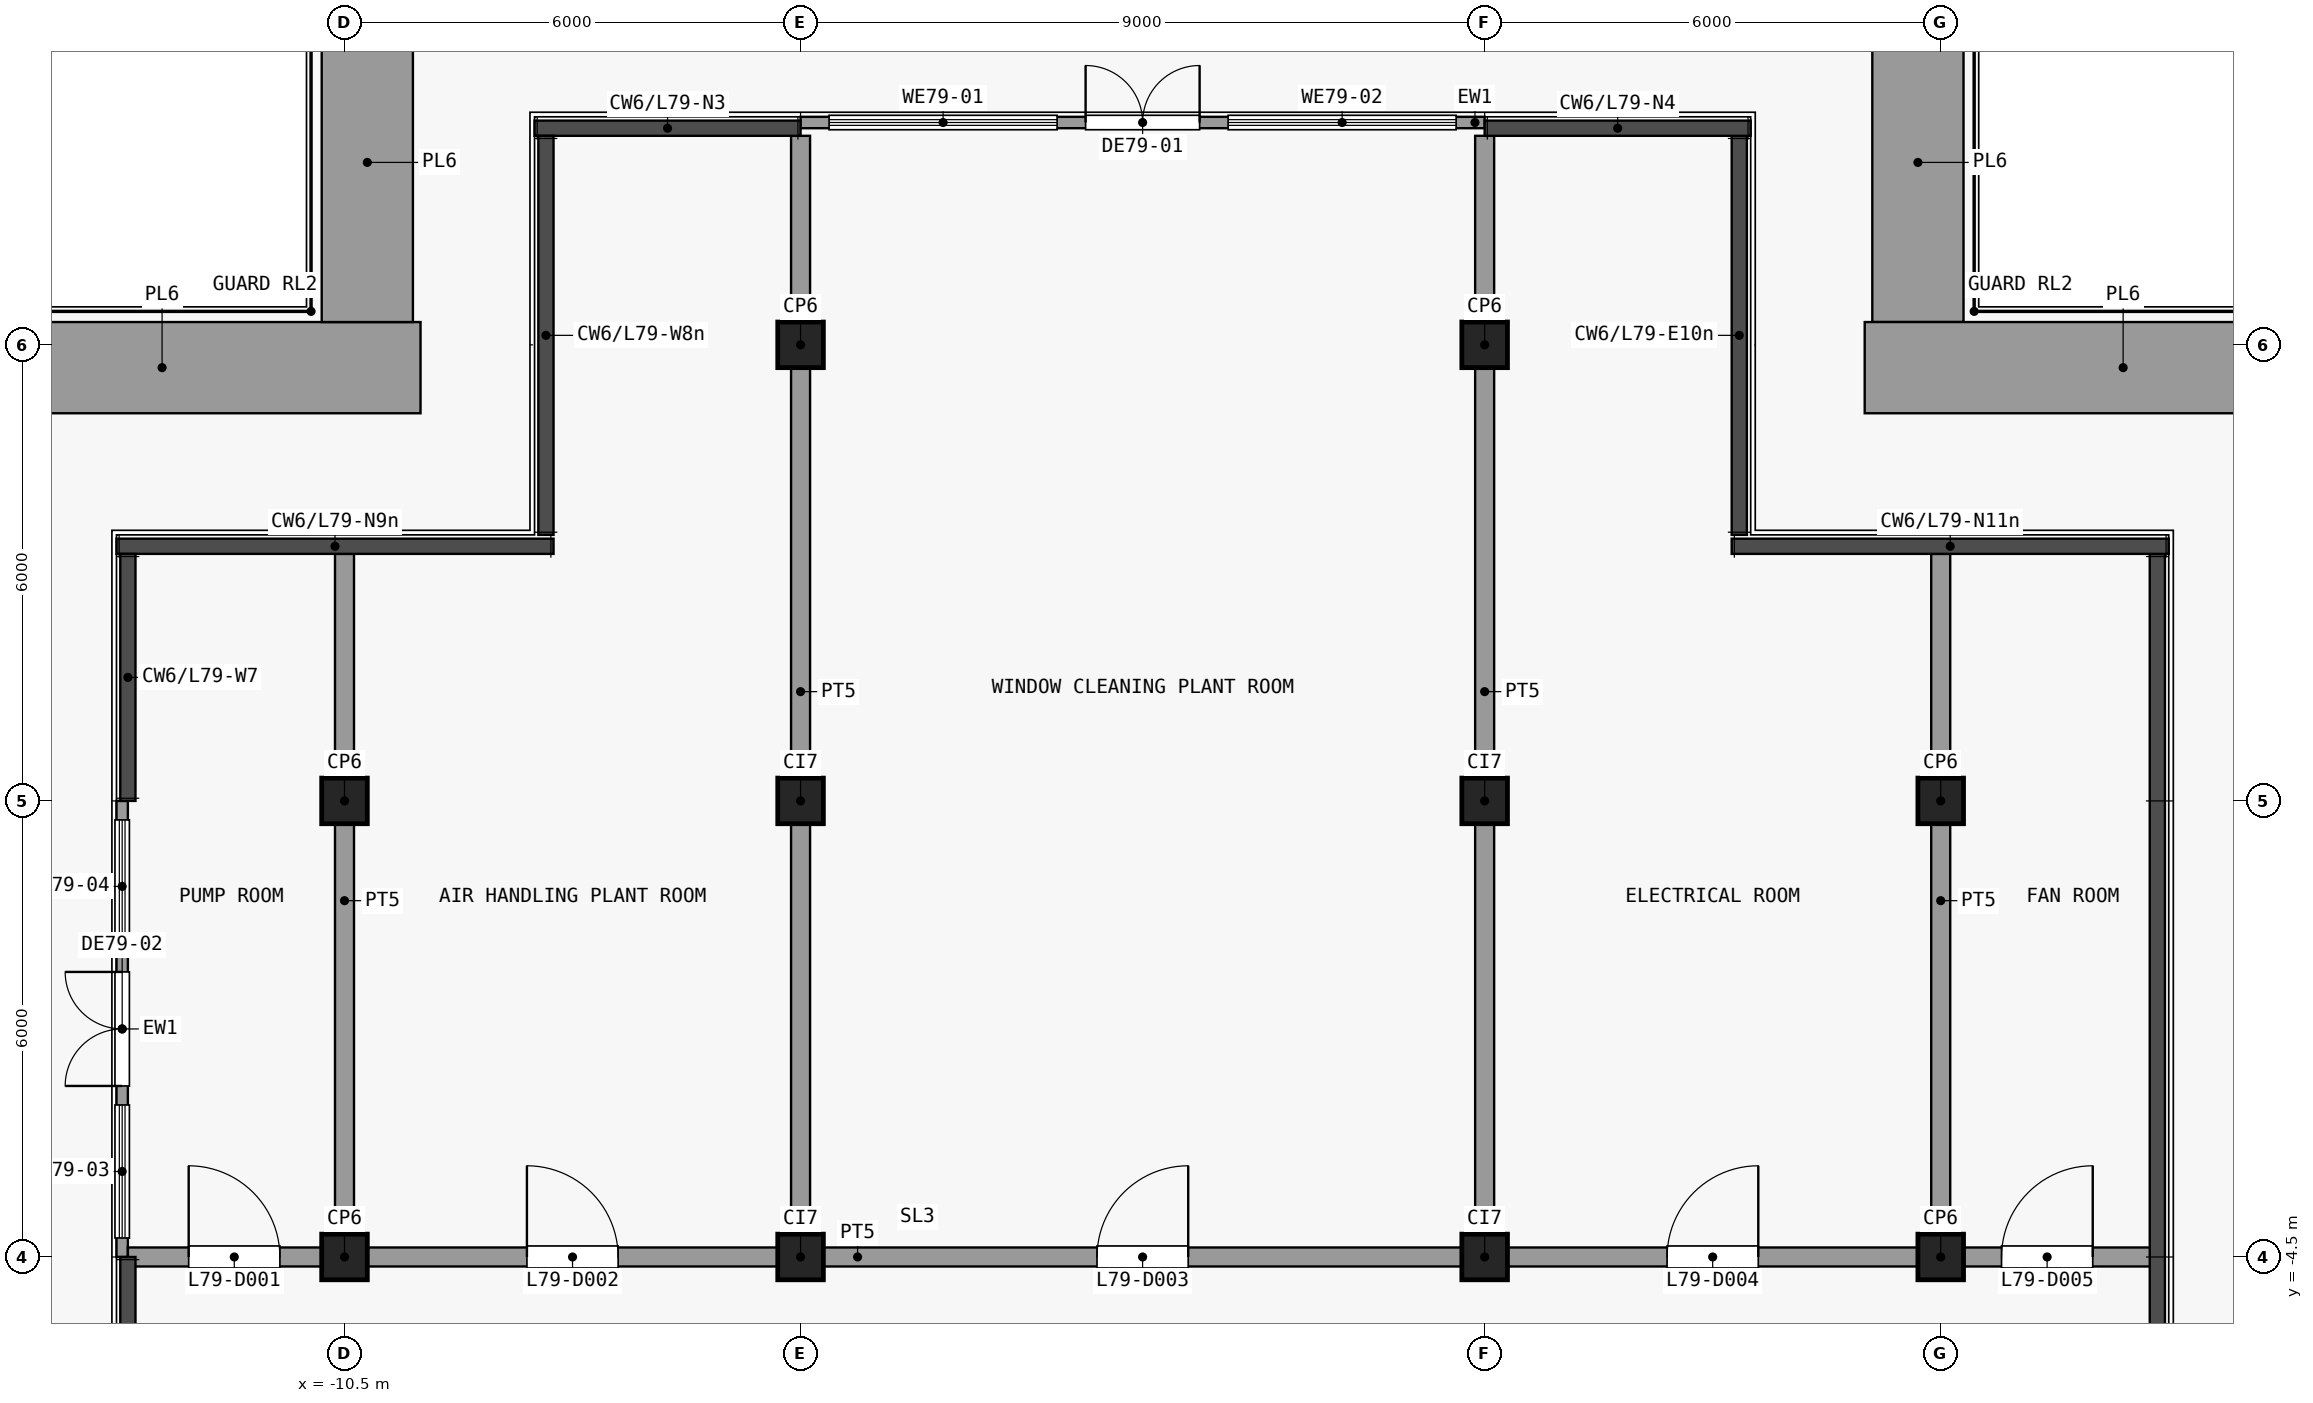
"""IFC4 building model, lengths in metres.
Left out: names, types, materials, properties, quantities, classifications, styles, units other than length and angle.
Written with IfcOpenShell. Run it as: python <this file> out.ifc"""

import sys

from ifc_helpers import new_model, si_unit, direction, frame, frame_2d, origin, origin_2d, place, context, subcontext, project, spatial, rectangle, extrude, element, fill, save


model = new_model("IFC4")
c1 = context("Model", 3, precision=1e-05, world=origin(), true_north=direction((0.0, 1.0)))
c2 = subcontext(c1, "Body", "Model", "MODEL_VIEW")
j1 = project(units=[si_unit("LENGTHUNIT", "METRE"), si_unit("PLANEANGLEUNIT", "RADIAN")], contexts=[c1])
p1 = place(None, origin())
s1 = spatial("IfcSite", under=j1, at=p1, CompositionType="ELEMENT")
p2 = place(p1, origin())
s2 = spatial("IfcBuilding", under=s1, at=p2, CompositionType="ELEMENT")
p3 = place(p2, frame((0.0, 0.0, 312.2)))
s3 = spatial("IfcBuildingStorey", under=s2, at=p3, CompositionType="ELEMENT", Elevation=312.2)
for number, where, z_axis, x_axis in (
    (1, (-10.5, -4.5, 0.0), (0.0, 0.0, 1.0), (1.0, 0.0, 0.0)),
    (2, (-10.5, 1.5, 0.0), (0.0, 0.0, 1.0), (1.0, 0.0, 0.0)),
    (3, (-4.5, -4.5, 0.0), (0.0, 0.0, 1.0), (1.0, 0.0, 0.0)),
    (4, (-4.5, 1.5, 0.0), (0.0, 0.0, 1.0), (1.0, 0.0, 0.0)),
    (5, (-4.5, 7.5, 0.0), (0.0, 0.0, 1.0), (1.0, 0.0, 0.0)),
    (6, (4.5, -4.5, 0.0), (0.0, 0.0, 1.0), (1.0, 0.0, 0.0)),
    (7, (4.5, 1.5, 0.0), (0.0, 0.0, 1.0), (1.0, 0.0, 0.0)),
    (8, (4.5, 7.5, 0.0), (0.0, 0.0, 1.0), (1.0, 0.0, 0.0)),
    (9, (10.5, -4.5, 0.0), (0.0, 0.0, 1.0), (1.0, 0.0, 0.0)),
    (10, (10.5, 1.5, 0.0), (0.0, 0.0, 1.0), (1.0, 0.0, 0.0)),
):
    element("IfcColumn", number, at=place(p3, frame(where, z_axis=z_axis, x_axis=x_axis)), inside=s3, PredefinedType="COLUMN", context=c2, shape_type="SweptSolid", body=[
        extrude(rectangle(XDim=0.6, YDim=0.6, at=origin_2d()), origin(), (0.0, 0.0, 1.0), 4.5),
    ])
p4 = place(p3, frame((-4.5, 10.425, 0.0), z_axis=(0.0, 0.0, 1.0), x_axis=(1.0, 0.0, 0.0)))
e11 = element("IfcWall", 11, at=p4, inside=s3, PredefinedType="SOLIDWALL", context=c2, shape_type="SweptSolid", body=[
    extrude(rectangle(XDim=9.0, YDim=0.15, at=frame_2d((4.5, 0.0))), origin(), (0.0, 0.0, 1.0), 4.2),
])
p5 = place(p4, frame((3.75, 0.0, 0.0)))
e12 = element("IfcOpeningElement", 12, at=p5, cuts=e11, PredefinedType="OPENING", context=c2, shape_type="SweptSolid", body=[
    extrude(rectangle(XDim=1.5, YDim=2.4, at=frame_2d((0.75, 1.2))), frame((0.0, 0.085, 0.0), z_axis=(0.0, -1.0, 0.0), x_axis=(1.0, 0.0, 0.0)), (0.0, 0.0, 1.0), 0.17),
])
p6 = place(p4, frame((0.375, 0.0, 0.9)))
e13 = element("IfcOpeningElement", 13, at=p6, cuts=e11, PredefinedType="OPENING", context=c2, shape_type="SweptSolid", body=[
    extrude(rectangle(XDim=3.0, YDim=2.1, at=frame_2d((1.5, 1.05))), frame((0.0, 0.085, 0.0), z_axis=(0.0, -1.0, 0.0), x_axis=(1.0, 0.0, 0.0)), (0.0, 0.0, 1.0), 0.17),
])
p7 = place(p4, frame((5.625, 0.0, 0.9)))
e14 = element("IfcOpeningElement", 14, at=p7, cuts=e11, PredefinedType="OPENING", context=c2, shape_type="SweptSolid", body=[
    extrude(rectangle(XDim=3.0, YDim=2.1, at=frame_2d((1.5, 1.05))), frame((0.0, 0.085, 0.0), z_axis=(0.0, -1.0, 0.0), x_axis=(1.0, 0.0, 0.0)), (0.0, 0.0, 1.0), 0.17),
])
p8 = place(p3, frame((-13.425, -4.5, 0.0), z_axis=(0.0, 0.0, 1.0), x_axis=(0.0, 1.0, 0.0)))
e15 = element("IfcWall", 15, at=p8, inside=s3, PredefinedType="SOLIDWALL", context=c2, shape_type="SweptSolid", body=[
    extrude(rectangle(XDim=6.0, YDim=0.15, at=frame_2d((3.0, 0.0))), origin(), (0.0, 0.0, 1.0), 4.2),
])
p9 = place(p8, frame((2.25, 0.0, 0.0)))
e16 = element("IfcOpeningElement", 16, at=p9, cuts=e15, PredefinedType="OPENING", context=c2, shape_type="SweptSolid", body=[
    extrude(rectangle(XDim=1.5, YDim=2.4, at=frame_2d((0.75, 1.2))), frame((0.0, 0.085, 0.0), z_axis=(0.0, -1.0, 0.0), x_axis=(1.0, 0.0, 0.0)), (0.0, 0.0, 1.0), 0.17),
])
p10 = place(p8, frame((0.25, 0.0, 0.9)))
e17 = element("IfcOpeningElement", 17, at=p10, cuts=e15, PredefinedType="OPENING", context=c2, shape_type="SweptSolid", body=[
    extrude(rectangle(XDim=1.75, YDim=2.1, at=frame_2d((0.875, 1.05))), frame((0.0, 0.085, 0.0), z_axis=(0.0, -1.0, 0.0), x_axis=(1.0, 0.0, 0.0)), (0.0, 0.0, 1.0), 0.17),
])
p11 = place(p8, frame((4.0, 0.0, 0.9)))
e18 = element("IfcOpeningElement", 18, at=p11, cuts=e15, PredefinedType="OPENING", context=c2, shape_type="SweptSolid", body=[
    extrude(rectangle(XDim=1.75, YDim=2.1, at=frame_2d((0.875, 1.05))), frame((0.0, 0.085, 0.0), z_axis=(0.0, -1.0, 0.0), x_axis=(1.0, 0.0, 0.0)), (0.0, 0.0, 1.0), 0.17),
])
p12 = place(p3, frame((-16.3, 7.2, 0.0), z_axis=(0.0, 0.0, 1.0), x_axis=(1.0, 0.0, 0.0)))
e19 = element("IfcWall", 19, at=p12, inside=s3, PredefinedType="USERDEFINED", context=c2, shape_type="SweptSolid", body=[
    extrude(rectangle(XDim=6.8, YDim=1.2, at=frame_2d((3.4, 0.0))), origin(), (0.0, 0.0, 1.0), 0.9),
])
for number, where, z_axis, x_axis in (
    (20, (-10.2, 7.8, 0.0), (0.0, 0.0, 1.0), (0.0, 1.0, 0.0)),
    (21, (10.2, 7.8, 0.0), (0.0, 0.0, 1.0), (0.0, 1.0, 0.0)),
):
    element("IfcWall", number, at=place(p3, frame(where, z_axis=z_axis, x_axis=x_axis)), inside=s3, PredefinedType="USERDEFINED", context=c2, shape_type="SweptSolid", body=[
        extrude(rectangle(XDim=4.2, YDim=1.2, at=frame_2d((2.1, 0.0))), origin(), (0.0, 0.0, 1.0), 0.9),
    ])
p13 = place(p3, frame((9.5, 7.2, 0.0), z_axis=(0.0, 0.0, 1.0), x_axis=(1.0, 0.0, 0.0)))
e22 = element("IfcWall", 22, at=p13, inside=s3, PredefinedType="USERDEFINED", context=c2, shape_type="SweptSolid", body=[
    extrude(rectangle(XDim=6.8, YDim=1.2, at=frame_2d((3.4, 0.0))), origin(), (0.0, 0.0, 1.0), 0.9),
])
p14 = place(p3, frame((-13.35, -4.5, 0.0), z_axis=(0.0, 0.0, 1.0), x_axis=(1.0, 0.0, 0.0)))
e23 = element("IfcWall", 23, at=p14, inside=s3, PredefinedType="PARTITIONING", context=c2, shape_type="SweptSolid", body=[
    extrude(rectangle(XDim=26.7, YDim=0.25, at=frame_2d((13.35, 0.0))), origin(), (0.0, 0.0, 1.0), 4.2),
])
p15 = place(p14, frame((0.8, 0.0, 0.0)))
e24 = element("IfcOpeningElement", 24, at=p15, cuts=e23, PredefinedType="OPENING", context=c2, shape_type="SweptSolid", body=[
    extrude(rectangle(XDim=1.2, YDim=2.1, at=frame_2d((0.6, 1.05))), frame((0.0, 0.135, 0.0), z_axis=(0.0, -1.0, 0.0), x_axis=(1.0, 0.0, 0.0)), (0.0, 0.0, 1.0), 0.27),
])
p16 = place(p14, frame((5.25, 0.0, 0.0)))
e25 = element("IfcOpeningElement", 25, at=p16, cuts=e23, PredefinedType="OPENING", context=c2, shape_type="SweptSolid", body=[
    extrude(rectangle(XDim=1.2, YDim=2.1, at=frame_2d((0.6, 1.05))), frame((0.0, 0.135, 0.0), z_axis=(0.0, -1.0, 0.0), x_axis=(1.0, 0.0, 0.0)), (0.0, 0.0, 1.0), 0.27),
])
p17 = place(p14, frame((12.75, 0.0, 0.0)))
e26 = element("IfcOpeningElement", 26, at=p17, cuts=e23, PredefinedType="OPENING", context=c2, shape_type="SweptSolid", body=[
    extrude(rectangle(XDim=1.2, YDim=2.1, at=frame_2d((0.6, 1.05))), frame((0.0, 0.135, 0.0), z_axis=(0.0, -1.0, 0.0), x_axis=(1.0, 0.0, 0.0)), (0.0, 0.0, 1.0), 0.27),
])
p18 = place(p14, frame((20.25, 0.0, 0.0)))
e27 = element("IfcOpeningElement", 27, at=p18, cuts=e23, PredefinedType="OPENING", context=c2, shape_type="SweptSolid", body=[
    extrude(rectangle(XDim=1.2, YDim=2.1, at=frame_2d((0.6, 1.05))), frame((0.0, 0.135, 0.0), z_axis=(0.0, -1.0, 0.0), x_axis=(1.0, 0.0, 0.0)), (0.0, 0.0, 1.0), 0.27),
])
p19 = place(p14, frame((24.65, 0.0, 0.0)))
e28 = element("IfcOpeningElement", 28, at=p19, cuts=e23, PredefinedType="OPENING", context=c2, shape_type="SweptSolid", body=[
    extrude(rectangle(XDim=1.2, YDim=2.1, at=frame_2d((0.6, 1.05))), frame((0.0, 0.135, 0.0), z_axis=(0.0, -1.0, 0.0), x_axis=(1.0, 0.0, 0.0)), (0.0, 0.0, 1.0), 0.27),
])
p20 = place(p3, frame((-10.5, -4.375, 0.0), z_axis=(0.0, 0.0, 1.0), x_axis=(0.0, 1.0, 0.0)))
e29 = element("IfcWall", 29, at=p20, inside=s3, PredefinedType="PARTITIONING", context=c2, shape_type="SweptSolid", body=[
    extrude(rectangle(XDim=9.125, YDim=0.25, at=frame_2d((4.562, 0.0))), origin(), (0.0, 0.0, 1.0), 4.2),
])
for number, where, z_axis, x_axis in (
    (30, (-4.5, -4.375, 0.0), (0.0, 0.0, 1.0), (0.0, 1.0, 0.0)),
    (31, (4.5, -4.375, 0.0), (0.0, 0.0, 1.0), (0.0, 1.0, 0.0)),
):
    element("IfcWall", number, at=place(p3, frame(where, z_axis=z_axis, x_axis=x_axis)), inside=s3, PredefinedType="PARTITIONING", context=c2, shape_type="SweptSolid", body=[
        extrude(rectangle(XDim=14.625, YDim=0.25, at=frame_2d((7.312, 0.0))), origin(), (0.0, 0.0, 1.0), 4.2),
    ])
p21 = place(p3, frame((10.5, -4.375, 0.0), z_axis=(0.0, 0.0, 1.0), x_axis=(0.0, 1.0, 0.0)))
e32 = element("IfcWall", 32, at=p21, inside=s3, PredefinedType="PARTITIONING", context=c2, shape_type="SweptSolid", body=[
    extrude(rectangle(XDim=9.125, YDim=0.25, at=frame_2d((4.562, 0.0))), origin(), (0.0, 0.0, 1.0), 4.2),
])
p22 = place(p5, origin())
e33 = element("IfcDoor", 33, at=p22, inside=s3, OperationType="DOUBLE_DOOR_SINGLE_SWING", PredefinedType="DOOR", context=c2, shape_type="SweptSolid", body=[
    extrude(rectangle(XDim=1.5, YDim=2.4, at=frame_2d((0.75, 1.2))), frame((0.0, 0.025, 0.0), z_axis=(0.0, -1.0, 0.0), x_axis=(1.0, 0.0, 0.0)), (0.0, 0.0, 1.0), 0.05),
])
fill(e12, e33)
p23 = place(p6, origin())
e34 = element("IfcWindow", 34, at=p23, inside=s3, PartitioningType="SINGLE_PANEL", PredefinedType="WINDOW", context=c2, shape_type="SweptSolid", body=[
    extrude(rectangle(XDim=3.0, YDim=2.1, at=frame_2d((1.5, 1.05))), frame((0.0, 0.03, 0.0), z_axis=(0.0, -1.0, 0.0), x_axis=(1.0, 0.0, 0.0)), (0.0, 0.0, 1.0), 0.06),
])
fill(e13, e34)
p24 = place(p7, origin())
e35 = element("IfcWindow", 35, at=p24, inside=s3, PartitioningType="SINGLE_PANEL", PredefinedType="WINDOW", context=c2, shape_type="SweptSolid", body=[
    extrude(rectangle(XDim=3.0, YDim=2.1, at=frame_2d((1.5, 1.05))), frame((0.0, 0.03, 0.0), z_axis=(0.0, -1.0, 0.0), x_axis=(1.0, 0.0, 0.0)), (0.0, 0.0, 1.0), 0.06),
])
fill(e14, e35)
p25 = place(p9, origin())
e36 = element("IfcDoor", 36, at=p25, inside=s3, OperationType="DOUBLE_DOOR_SINGLE_SWING", PredefinedType="DOOR", context=c2, shape_type="SweptSolid", body=[
    extrude(rectangle(XDim=1.5, YDim=2.4, at=frame_2d((0.75, 1.2))), frame((0.0, 0.025, 0.0), z_axis=(0.0, -1.0, 0.0), x_axis=(1.0, 0.0, 0.0)), (0.0, 0.0, 1.0), 0.05),
])
fill(e16, e36)
p26 = place(p10, origin())
e37 = element("IfcWindow", 37, at=p26, inside=s3, PartitioningType="SINGLE_PANEL", PredefinedType="WINDOW", context=c2, shape_type="SweptSolid", body=[
    extrude(rectangle(XDim=1.75, YDim=2.1, at=frame_2d((0.875, 1.05))), frame((0.0, 0.03, 0.0), z_axis=(0.0, -1.0, 0.0), x_axis=(1.0, 0.0, 0.0)), (0.0, 0.0, 1.0), 0.06),
])
fill(e17, e37)
p27 = place(p11, origin())
e38 = element("IfcWindow", 38, at=p27, inside=s3, PartitioningType="SINGLE_PANEL", PredefinedType="WINDOW", context=c2, shape_type="SweptSolid", body=[
    extrude(rectangle(XDim=1.75, YDim=2.1, at=frame_2d((0.875, 1.05))), frame((0.0, 0.03, 0.0), z_axis=(0.0, -1.0, 0.0), x_axis=(1.0, 0.0, 0.0)), (0.0, 0.0, 1.0), 0.06),
])
fill(e18, e38)
p28 = place(p15, origin())
e39 = element("IfcDoor", 39, at=p28, inside=s3, OperationType="SINGLE_SWING_RIGHT", PredefinedType="DOOR", context=c2, shape_type="SweptSolid", body=[
    extrude(rectangle(XDim=1.2, YDim=2.1, at=frame_2d((0.6, 1.05))), frame((0.0, 0.025, 0.0), z_axis=(0.0, -1.0, 0.0), x_axis=(1.0, 0.0, 0.0)), (0.0, 0.0, 1.0), 0.05),
])
fill(e24, e39)
p29 = place(p16, origin())
e40 = element("IfcDoor", 40, at=p29, inside=s3, OperationType="SINGLE_SWING_RIGHT", PredefinedType="DOOR", context=c2, shape_type="SweptSolid", body=[
    extrude(rectangle(XDim=1.2, YDim=2.1, at=frame_2d((0.6, 1.05))), frame((0.0, 0.025, 0.0), z_axis=(0.0, -1.0, 0.0), x_axis=(1.0, 0.0, 0.0)), (0.0, 0.0, 1.0), 0.05),
])
fill(e25, e40)
p30 = place(p17, origin())
e41 = element("IfcDoor", 41, at=p30, inside=s3, OperationType="SINGLE_SWING_LEFT", PredefinedType="DOOR", context=c2, shape_type="SweptSolid", body=[
    extrude(rectangle(XDim=1.2, YDim=2.1, at=frame_2d((0.6, 1.05))), frame((0.0, 0.025, 0.0), z_axis=(0.0, -1.0, 0.0), x_axis=(1.0, 0.0, 0.0)), (0.0, 0.0, 1.0), 0.05),
])
fill(e26, e41)
p31 = place(p18, origin())
e42 = element("IfcDoor", 42, at=p31, inside=s3, OperationType="SINGLE_SWING_LEFT", PredefinedType="DOOR", context=c2, shape_type="SweptSolid", body=[
    extrude(rectangle(XDim=1.2, YDim=2.1, at=frame_2d((0.6, 1.05))), frame((0.0, 0.025, 0.0), z_axis=(0.0, -1.0, 0.0), x_axis=(1.0, 0.0, 0.0)), (0.0, 0.0, 1.0), 0.05),
])
fill(e27, e42)
p32 = place(p19, origin())
e43 = element("IfcDoor", 43, at=p32, inside=s3, OperationType="SINGLE_SWING_LEFT", PredefinedType="DOOR", context=c2, shape_type="SweptSolid", body=[
    extrude(rectangle(XDim=1.2, YDim=2.1, at=frame_2d((0.6, 1.05))), frame((0.0, 0.025, 0.0), z_axis=(0.0, -1.0, 0.0), x_axis=(1.0, 0.0, 0.0)), (0.0, 0.0, 1.0), 0.05),
])
fill(e28, e43)
save(model, sys.argv[1])
